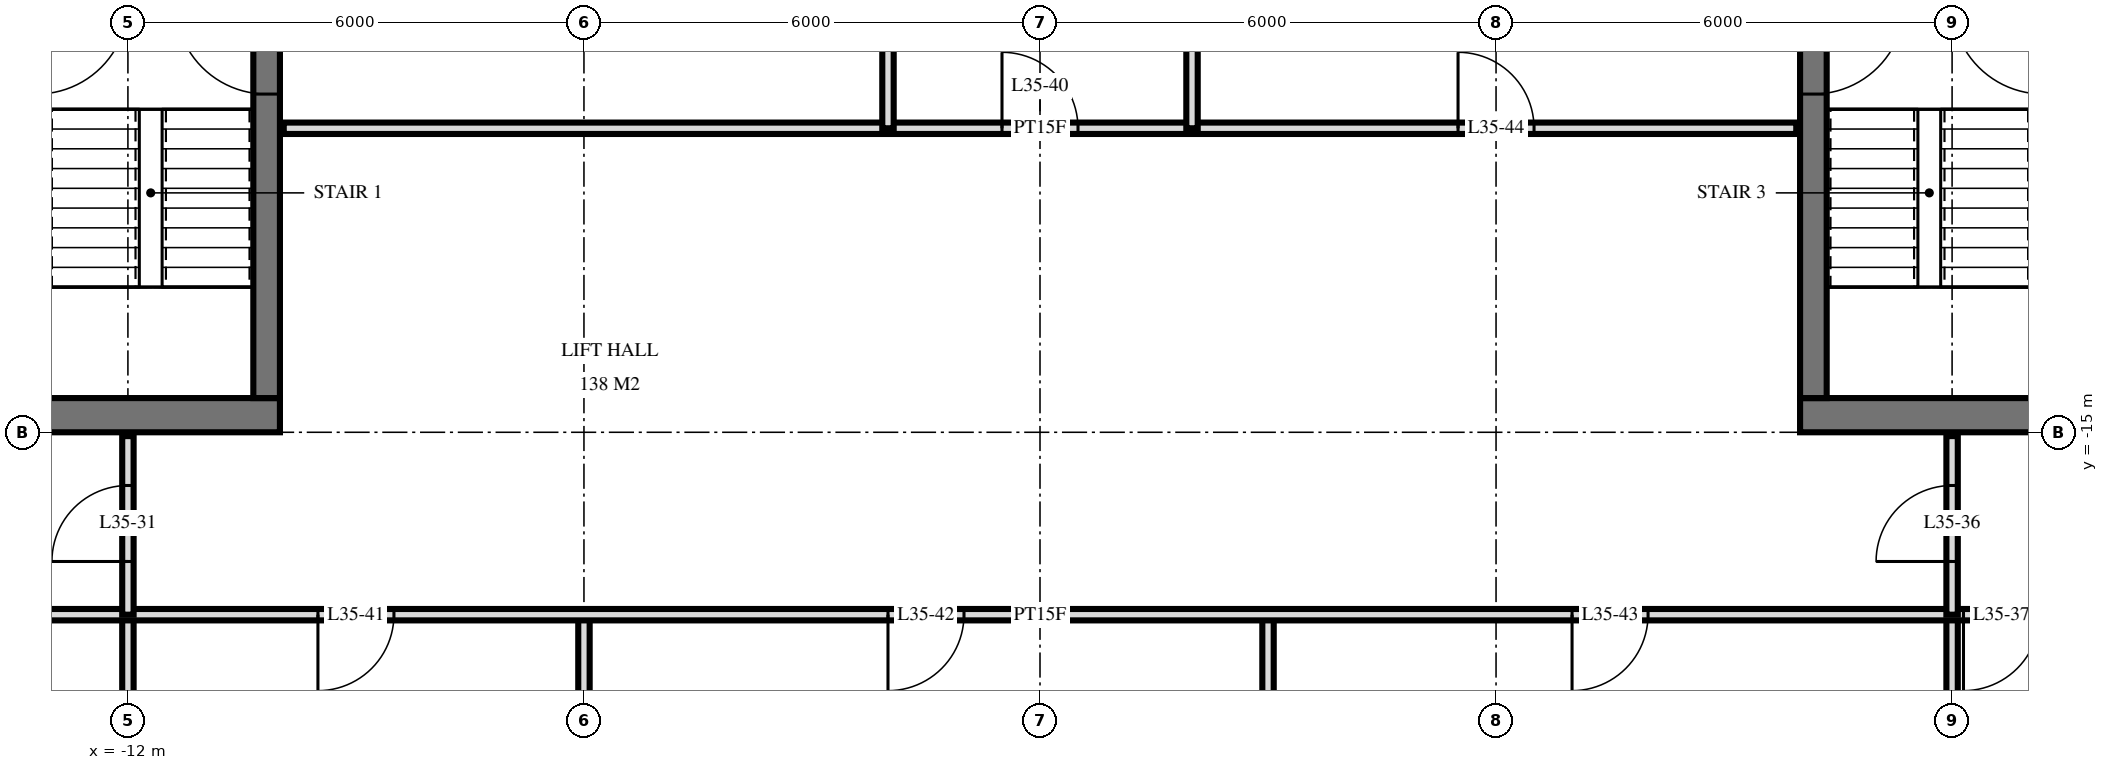
"""IFC4 building model, lengths in metres.
Left out: names, types, materials, properties, quantities, classifications, styles, units other than length and angle.
Written with IfcOpenShell. Run it as: python <this file> out.ifc"""

import sys

from ifc_helpers import new_model, si_unit, direction, frame, frame_2d, origin, place, context, subcontext, project, spatial, rectangle, extrude, element, fill, save


model = new_model("IFC4")
c1 = context("Model", 3, precision=1e-05, world=origin(), true_north=direction((0.0, 1.0)))
c2 = subcontext(c1, "Body", "Model", "MODEL_VIEW")
j1 = project(units=[si_unit("LENGTHUNIT", "METRE"), si_unit("PLANEANGLEUNIT", "RADIAN")], contexts=[c1])
p1 = place(None, origin())
s1 = spatial("IfcSite", under=j1, at=p1, CompositionType="ELEMENT")
p2 = place(p1, origin())
s2 = spatial("IfcBuilding", under=s1, at=p2, CompositionType="ELEMENT")
p3 = place(p2, frame((0.0, 0.0, 138.0)))
s3 = spatial("IfcBuildingStorey", under=s2, at=p3, CompositionType="ELEMENT", Elevation=138.0)
p4 = place(p3, frame((-24.5, -14.775, 0.0), z_axis=(0.0, 0.0, 1.0), x_axis=(1.0, 0.0, 0.0)))
e1 = element("IfcWall", 1, at=p4, inside=s3, PredefinedType="SHEAR", context=c2, shape_type="SweptSolid", body=[
    extrude(rectangle(XDim=14.5, YDim=0.45, at=frame_2d((7.25, 0.0))), origin(), (0.0, 0.0, 1.0), 3.6),
])
p5 = place(p4, frame((6.2, 0.0, 0.0)))
e2 = element("IfcOpeningElement", 2, at=p5, cuts=e1, PredefinedType="OPENING", context=c2, shape_type="SweptSolid", body=[
    extrude(rectangle(XDim=1.2, YDim=2.1, at=frame_2d((0.6, 1.05))), frame((0.0, 0.235, 0.0), z_axis=(0.0, -1.0, 0.0), x_axis=(1.0, 0.0, 0.0)), (0.0, 0.0, 1.0), 0.47),
])
p6 = place(p4, frame((9.25, 0.0, 0.0)))
e3 = element("IfcOpeningElement", 3, at=p6, cuts=e1, PredefinedType="OPENING", context=c2, shape_type="SweptSolid", body=[
    extrude(rectangle(XDim=1.1, YDim=2.1, at=frame_2d((0.55, 1.05))), frame((0.0, 0.235, 0.0), z_axis=(0.0, -1.0, 0.0), x_axis=(1.0, 0.0, 0.0)), (0.0, 0.0, 1.0), 0.47),
])
p7 = place(p4, frame((3.5, 0.0, 0.0)))
e4 = element("IfcOpeningElement", 4, at=p7, cuts=e1, PredefinedType="OPENING", context=c2, shape_type="SweptSolid", body=[
    extrude(rectangle(XDim=0.9, YDim=2.1, at=frame_2d((0.45, 1.05))), frame((0.0, 0.235, 0.0), z_axis=(0.0, -1.0, 0.0), x_axis=(1.0, 0.0, 0.0)), (0.0, 0.0, 1.0), 0.47),
])
p8 = place(p4, frame((1.05, 0.0, 0.0)))
e5 = element("IfcOpeningElement", 5, at=p8, cuts=e1, PredefinedType="OPENING", context=c2, shape_type="SweptSolid", body=[
    extrude(rectangle(XDim=1.0, YDim=2.1, at=frame_2d((0.5, 1.05))), frame((0.0, 0.235, 0.0), z_axis=(0.0, -1.0, 0.0), x_axis=(1.0, 0.0, 0.0)), (0.0, 0.0, 1.0), 0.47),
])
p9 = place(p3, frame((-10.175, -14.55, 0.0), z_axis=(0.0, 0.0, 1.0), x_axis=(0.0, 1.0, 0.0)))
e6 = element("IfcWall", 6, at=p9, inside=s3, PredefinedType="SHEAR", context=c2, shape_type="SweptSolid", body=[
    extrude(rectangle(XDim=14.1, YDim=0.35, at=frame_2d((7.05, 0.0))), origin(), (0.0, 0.0, 1.0), 3.6),
])
p10 = place(p9, frame((8.4, 0.0, 0.0)))
e7 = element("IfcOpeningElement", 7, at=p10, cuts=e6, PredefinedType="OPENING", context=c2, shape_type="SweptSolid", body=[
    extrude(rectangle(XDim=1.4, YDim=2.4, at=frame_2d((0.7, 1.2))), frame((0.0, 0.185, 0.0), z_axis=(0.0, -1.0, 0.0), x_axis=(1.0, 0.0, 0.0)), (0.0, 0.0, 1.0), 0.37),
])
p11 = place(p9, frame((10.0, 0.0, 0.0)))
e8 = element("IfcOpeningElement", 8, at=p11, cuts=e6, PredefinedType="OPENING", context=c2, shape_type="SweptSolid", body=[
    extrude(rectangle(XDim=1.4, YDim=2.4, at=frame_2d((0.7, 1.2))), frame((0.0, 0.185, 0.0), z_axis=(0.0, -1.0, 0.0), x_axis=(1.0, 0.0, 0.0)), (0.0, 0.0, 1.0), 0.37),
])
p12 = place(p9, frame((4.0, 0.0, 0.0)))
e9 = element("IfcOpeningElement", 9, at=p12, cuts=e6, PredefinedType="OPENING", context=c2, shape_type="SweptSolid", body=[
    extrude(rectangle(XDim=1.2, YDim=2.1, at=frame_2d((0.6, 1.05))), frame((0.0, 0.185, 0.0), z_axis=(0.0, -1.0, 0.0), x_axis=(1.0, 0.0, 0.0)), (0.0, 0.0, 1.0), 0.37),
])
p13 = place(p3, frame((10.0, -14.775, 0.0), z_axis=(0.0, 0.0, 1.0), x_axis=(1.0, 0.0, 0.0)))
e10 = element("IfcWall", 10, at=p13, inside=s3, PredefinedType="SHEAR", context=c2, shape_type="SweptSolid", body=[
    extrude(rectangle(XDim=14.5, YDim=0.45, at=frame_2d((7.25, 0.0))), origin(), (0.0, 0.0, 1.0), 3.6),
])
p14 = place(p13, frame((7.1, 0.0, 0.0)))
e11 = element("IfcOpeningElement", 11, at=p14, cuts=e10, PredefinedType="OPENING", context=c2, shape_type="SweptSolid", body=[
    extrude(rectangle(XDim=1.2, YDim=2.1, at=frame_2d((0.6, 1.05))), frame((0.0, 0.235, 0.0), z_axis=(0.0, -1.0, 0.0), x_axis=(1.0, 0.0, 0.0)), (0.0, 0.0, 1.0), 0.47),
])
p15 = place(p13, frame((4.15, 0.0, 0.0)))
e12 = element("IfcOpeningElement", 12, at=p15, cuts=e10, PredefinedType="OPENING", context=c2, shape_type="SweptSolid", body=[
    extrude(rectangle(XDim=1.1, YDim=2.1, at=frame_2d((0.55, 1.05))), frame((0.0, 0.235, 0.0), z_axis=(0.0, -1.0, 0.0), x_axis=(1.0, 0.0, 0.0)), (0.0, 0.0, 1.0), 0.47),
])
p16 = place(p13, frame((10.1, 0.0, 0.0)))
e13 = element("IfcOpeningElement", 13, at=p16, cuts=e10, PredefinedType="OPENING", context=c2, shape_type="SweptSolid", body=[
    extrude(rectangle(XDim=0.9, YDim=2.1, at=frame_2d((0.45, 1.05))), frame((0.0, 0.235, 0.0), z_axis=(0.0, -1.0, 0.0), x_axis=(1.0, 0.0, 0.0)), (0.0, 0.0, 1.0), 0.47),
])
p17 = place(p13, frame((12.45, 0.0, 0.0)))
e14 = element("IfcOpeningElement", 14, at=p17, cuts=e10, PredefinedType="OPENING", context=c2, shape_type="SweptSolid", body=[
    extrude(rectangle(XDim=1.0, YDim=2.1, at=frame_2d((0.5, 1.05))), frame((0.0, 0.235, 0.0), z_axis=(0.0, -1.0, 0.0), x_axis=(1.0, 0.0, 0.0)), (0.0, 0.0, 1.0), 0.47),
])
p18 = place(p3, frame((10.175, -14.55, 0.0), z_axis=(0.0, 0.0, 1.0), x_axis=(0.0, 1.0, 0.0)))
e15 = element("IfcWall", 15, at=p18, inside=s3, PredefinedType="SHEAR", context=c2, shape_type="SweptSolid", body=[
    extrude(rectangle(XDim=14.1, YDim=0.35, at=frame_2d((7.05, 0.0))), origin(), (0.0, 0.0, 1.0), 3.6),
])
p19 = place(p18, frame((8.4, 0.0, 0.0)))
e16 = element("IfcOpeningElement", 16, at=p19, cuts=e15, PredefinedType="OPENING", context=c2, shape_type="SweptSolid", body=[
    extrude(rectangle(XDim=1.4, YDim=2.4, at=frame_2d((0.7, 1.2))), frame((0.0, 0.185, 0.0), z_axis=(0.0, -1.0, 0.0), x_axis=(1.0, 0.0, 0.0)), (0.0, 0.0, 1.0), 0.37),
])
p20 = place(p18, frame((10.0, 0.0, 0.0)))
e17 = element("IfcOpeningElement", 17, at=p20, cuts=e15, PredefinedType="OPENING", context=c2, shape_type="SweptSolid", body=[
    extrude(rectangle(XDim=1.4, YDim=2.4, at=frame_2d((0.7, 1.2))), frame((0.0, 0.185, 0.0), z_axis=(0.0, -1.0, 0.0), x_axis=(1.0, 0.0, 0.0)), (0.0, 0.0, 1.0), 0.37),
])
p21 = place(p18, frame((4.0, 0.0, 0.0)))
e18 = element("IfcOpeningElement", 18, at=p21, cuts=e15, PredefinedType="OPENING", context=c2, shape_type="SweptSolid", body=[
    extrude(rectangle(XDim=1.2, YDim=2.1, at=frame_2d((0.6, 1.05))), frame((0.0, 0.185, 0.0), z_axis=(0.0, -1.0, 0.0), x_axis=(1.0, 0.0, 0.0)), (0.0, 0.0, 1.0), 0.37),
])
p22 = place(p3, frame((12.0, -17.4, 0.0), z_axis=(0.0, 0.0, 1.0), x_axis=(0.0, 1.0, 0.0)))
e19 = element("IfcWall", 19, at=p22, inside=s3, PredefinedType="PARTITIONING", context=c2, shape_type="SweptSolid", body=[
    extrude(rectangle(XDim=2.35, YDim=0.15, at=frame_2d((1.175, 0.0))), origin(), (0.0, 0.0, 1.0), 3.32),
])
p23 = place(p22, frame((0.7, 0.0, 0.0)))
e20 = element("IfcOpeningElement", 20, at=p23, cuts=e19, PredefinedType="OPENING", context=c2, shape_type="SweptSolid", body=[
    extrude(rectangle(XDim=1.0, YDim=2.1, at=frame_2d((0.5, 1.05))), frame((0.0, 0.085, 0.0), z_axis=(0.0, -1.0, 0.0), x_axis=(1.0, 0.0, 0.0)), (0.0, 0.0, 1.0), 0.17),
])
for number, where, z_axis, x_axis in (
    (21, (12.0, -33.62, 0.0), (0.0, 0.0, 1.0), (0.0, 1.0, 0.0)),
    (22, (3.0, -33.62, 0.0), (0.0, 0.0, 1.0), (0.0, 1.0, 0.0)),
):
    element("IfcWall", number, at=place(p3, frame(where, z_axis=z_axis, x_axis=x_axis)), inside=s3, PredefinedType="PARTITIONING", context=c2, shape_type="SweptSolid", body=[
        extrude(rectangle(XDim=16.22, YDim=0.15, at=frame_2d((8.11, 0.0))), origin(), (0.0, 0.0, 1.0), 3.32),
    ])
for number, where, z_axis, x_axis in (
    (23, (2.0, -11.0, 0.0), (0.0, 0.0, 1.0), (0.0, 1.0, 0.0)),
    (24, (-2.0, -11.0, 0.0), (0.0, 0.0, 1.0), (0.0, 1.0, 0.0)),
):
    element("IfcWall", number, at=place(p3, frame(where, z_axis=z_axis, x_axis=x_axis)), inside=s3, PredefinedType="PARTITIONING", context=c2, shape_type="SweptSolid", body=[
        extrude(rectangle(XDim=4.0, YDim=0.15, at=frame_2d((2.0, 0.0))), origin(), (0.0, 0.0, 1.0), 3.32),
    ])
p24 = place(p3, frame((-6.0, -33.62, 0.0), z_axis=(0.0, 0.0, 1.0), x_axis=(0.0, 1.0, 0.0)))
e25 = element("IfcWall", 25, at=p24, inside=s3, PredefinedType="PARTITIONING", context=c2, shape_type="SweptSolid", body=[
    extrude(rectangle(XDim=16.22, YDim=0.15, at=frame_2d((8.11, 0.0))), origin(), (0.0, 0.0, 1.0), 3.32),
])
p25 = place(p3, frame((-12.0, -17.4, 0.0), z_axis=(0.0, 0.0, 1.0), x_axis=(0.0, 1.0, 0.0)))
e26 = element("IfcWall", 26, at=p25, inside=s3, PredefinedType="PARTITIONING", context=c2, shape_type="SweptSolid", body=[
    extrude(rectangle(XDim=2.35, YDim=0.15, at=frame_2d((1.175, 0.0))), origin(), (0.0, 0.0, 1.0), 3.32),
])
p26 = place(p25, frame((0.7, 0.0, 0.0)))
e27 = element("IfcOpeningElement", 27, at=p26, cuts=e26, PredefinedType="OPENING", context=c2, shape_type="SweptSolid", body=[
    extrude(rectangle(XDim=1.0, YDim=2.1, at=frame_2d((0.5, 1.05))), frame((0.0, 0.085, 0.0), z_axis=(0.0, -1.0, 0.0), x_axis=(1.0, 0.0, 0.0)), (0.0, 0.0, 1.0), 0.17),
])
p27 = place(p3, frame((-12.0, -33.62, 0.0), z_axis=(0.0, 0.0, 1.0), x_axis=(0.0, 1.0, 0.0)))
e28 = element("IfcWall", 28, at=p27, inside=s3, PredefinedType="PARTITIONING", context=c2, shape_type="SweptSolid", body=[
    extrude(rectangle(XDim=16.22, YDim=0.15, at=frame_2d((8.11, 0.0))), origin(), (0.0, 0.0, 1.0), 3.32),
])
p28 = place(p3, frame((-28.02, -17.4, 0.0), z_axis=(0.0, 0.0, 1.0), x_axis=(1.0, 0.0, 0.0)))
e29 = element("IfcWall", 29, at=p28, inside=s3, PredefinedType="PARTITIONING", context=c2, shape_type="SweptSolid", body=[
    extrude(rectangle(XDim=56.04, YDim=0.15, at=frame_2d((28.02, 0.0))), origin(), (0.0, 0.0, 1.0), 3.32),
])
p29 = place(p28, frame((13.17, 0.0, 0.0)))
e30 = element("IfcOpeningElement", 30, at=p29, cuts=e29, PredefinedType="OPENING", context=c2, shape_type="SweptSolid", body=[
    extrude(rectangle(XDim=1.0, YDim=2.1, at=frame_2d((0.5, 1.05))), frame((0.0, 0.085, 0.0), z_axis=(0.0, -1.0, 0.0), x_axis=(1.0, 0.0, 0.0)), (0.0, 0.0, 1.0), 0.17),
])
p30 = place(p28, frame((11.87, 0.0, 0.0)))
e31 = element("IfcOpeningElement", 31, at=p30, cuts=e29, PredefinedType="OPENING", context=c2, shape_type="SweptSolid", body=[
    extrude(rectangle(XDim=1.0, YDim=2.1, at=frame_2d((0.5, 1.05))), frame((0.0, 0.085, 0.0), z_axis=(0.0, -1.0, 0.0), x_axis=(1.0, 0.0, 0.0)), (0.0, 0.0, 1.0), 0.17),
])
p31 = place(p28, frame((2.32, 0.0, 0.0)))
e32 = element("IfcOpeningElement", 32, at=p31, cuts=e29, PredefinedType="OPENING", context=c2, shape_type="SweptSolid", body=[
    extrude(rectangle(XDim=1.0, YDim=2.1, at=frame_2d((0.5, 1.05))), frame((0.0, 0.085, 0.0), z_axis=(0.0, -1.0, 0.0), x_axis=(1.0, 0.0, 0.0)), (0.0, 0.0, 1.0), 0.17),
])
p32 = place(p28, frame((40.17, 0.0, 0.0)))
e33 = element("IfcOpeningElement", 33, at=p32, cuts=e29, PredefinedType="OPENING", context=c2, shape_type="SweptSolid", body=[
    extrude(rectangle(XDim=1.0, YDim=2.1, at=frame_2d((0.5, 1.05))), frame((0.0, 0.085, 0.0), z_axis=(0.0, -1.0, 0.0), x_axis=(1.0, 0.0, 0.0)), (0.0, 0.0, 1.0), 0.17),
])
p33 = place(p28, frame((51.22, 0.0, 0.0)))
e34 = element("IfcOpeningElement", 34, at=p33, cuts=e29, PredefinedType="OPENING", context=c2, shape_type="SweptSolid", body=[
    extrude(rectangle(XDim=1.0, YDim=2.1, at=frame_2d((0.5, 1.05))), frame((0.0, 0.085, 0.0), z_axis=(0.0, -1.0, 0.0), x_axis=(1.0, 0.0, 0.0)), (0.0, 0.0, 1.0), 0.17),
])
p34 = place(p28, frame((18.52, 0.0, 0.0)))
e35 = element("IfcOpeningElement", 35, at=p34, cuts=e29, PredefinedType="OPENING", context=c2, shape_type="SweptSolid", body=[
    extrude(rectangle(XDim=1.0, YDim=2.1, at=frame_2d((0.5, 1.05))), frame((0.0, 0.085, 0.0), z_axis=(0.0, -1.0, 0.0), x_axis=(1.0, 0.0, 0.0)), (0.0, 0.0, 1.0), 0.17),
])
p35 = place(p28, frame((26.02, 0.0, 0.0)))
e36 = element("IfcOpeningElement", 36, at=p35, cuts=e29, PredefinedType="OPENING", context=c2, shape_type="SweptSolid", body=[
    extrude(rectangle(XDim=1.0, YDim=2.1, at=frame_2d((0.5, 1.05))), frame((0.0, 0.085, 0.0), z_axis=(0.0, -1.0, 0.0), x_axis=(1.0, 0.0, 0.0)), (0.0, 0.0, 1.0), 0.17),
])
p36 = place(p28, frame((35.02, 0.0, 0.0)))
e37 = element("IfcOpeningElement", 37, at=p36, cuts=e29, PredefinedType="OPENING", context=c2, shape_type="SweptSolid", body=[
    extrude(rectangle(XDim=1.0, YDim=2.1, at=frame_2d((0.5, 1.05))), frame((0.0, 0.085, 0.0), z_axis=(0.0, -1.0, 0.0), x_axis=(1.0, 0.0, 0.0)), (0.0, 0.0, 1.0), 0.17),
])
p37 = place(p3, frame((-9.95, -11.0, 0.0), z_axis=(0.0, 0.0, 1.0), x_axis=(1.0, 0.0, 0.0)))
e38 = element("IfcWall", 38, at=p37, inside=s3, PredefinedType="PARTITIONING", context=c2, shape_type="SweptSolid", body=[
    extrude(rectangle(XDim=19.9, YDim=0.15, at=frame_2d((9.95, 0.0))), origin(), (0.0, 0.0, 1.0), 3.32),
])
p38 = place(p37, frame((9.45, 0.0, 0.0)))
e39 = element("IfcOpeningElement", 39, at=p38, cuts=e38, PredefinedType="OPENING", context=c2, shape_type="SweptSolid", body=[
    extrude(rectangle(XDim=1.0, YDim=2.1, at=frame_2d((0.5, 1.05))), frame((0.0, 0.085, 0.0), z_axis=(0.0, -1.0, 0.0), x_axis=(1.0, 0.0, 0.0)), (0.0, 0.0, 1.0), 0.17),
])
p39 = place(p37, frame((15.45, 0.0, 0.0)))
e40 = element("IfcOpeningElement", 40, at=p39, cuts=e38, PredefinedType="OPENING", context=c2, shape_type="SweptSolid", body=[
    extrude(rectangle(XDim=1.0, YDim=2.1, at=frame_2d((0.5, 1.05))), frame((0.0, 0.085, 0.0), z_axis=(0.0, -1.0, 0.0), x_axis=(1.0, 0.0, 0.0)), (0.0, 0.0, 1.0), 0.17),
])
p40 = place(p12, origin())
e41 = element("IfcDoor", 41, at=p40, inside=s3, OperationType="SINGLE_SWING_LEFT", PredefinedType="DOOR", context=c2, shape_type="SweptSolid", body=[
    extrude(rectangle(XDim=1.2, YDim=2.1, at=frame_2d((0.6, 1.05))), frame((0.0, 0.025, 0.0), z_axis=(0.0, -1.0, 0.0), x_axis=(1.0, 0.0, 0.0)), (0.0, 0.0, 1.0), 0.05),
])
fill(e9, e41)
p41 = place(p21, frame((0.6, 0.0, 0.0), z_axis=(0.0, 0.0, 1.0), x_axis=(-1.0, 0.0, 0.0)))
e42 = element("IfcDoor", 42, at=p41, inside=s3, OperationType="SINGLE_SWING_RIGHT", PredefinedType="DOOR", context=c2, shape_type="SweptSolid", body=[
    extrude(rectangle(XDim=1.2, YDim=2.1, at=frame_2d((0.0, 1.05))), frame((0.0, -0.025, 0.0), z_axis=(0.0, 1.0, 0.0), x_axis=(-1.0, 0.0, 0.0)), (0.0, 0.0, 1.0), 0.05),
])
fill(e18, e42)
p42 = place(p26, origin())
e43 = element("IfcDoor", 43, at=p42, inside=s3, OperationType="SINGLE_SWING_RIGHT", PredefinedType="DOOR", context=c2, shape_type="SweptSolid", body=[
    extrude(rectangle(XDim=1.0, YDim=2.1, at=frame_2d((0.5, 1.05))), frame((0.0, 0.025, 0.0), z_axis=(0.0, -1.0, 0.0), x_axis=(1.0, 0.0, 0.0)), (0.0, 0.0, 1.0), 0.05),
])
fill(e27, e43)
p43 = place(p23, origin())
e44 = element("IfcDoor", 44, at=p43, inside=s3, OperationType="SINGLE_SWING_RIGHT", PredefinedType="DOOR", context=c2, shape_type="SweptSolid", body=[
    extrude(rectangle(XDim=1.0, YDim=2.1, at=frame_2d((0.5, 1.05))), frame((0.0, 0.025, 0.0), z_axis=(0.0, -1.0, 0.0), x_axis=(1.0, 0.0, 0.0)), (0.0, 0.0, 1.0), 0.05),
])
fill(e20, e44)
p44 = place(p32, frame((0.5, 0.0, 0.0), z_axis=(0.0, 0.0, 1.0), x_axis=(-1.0, 0.0, 0.0)))
e45 = element("IfcDoor", 45, at=p44, inside=s3, OperationType="SINGLE_SWING_LEFT", PredefinedType="DOOR", context=c2, shape_type="SweptSolid", body=[
    extrude(rectangle(XDim=1.0, YDim=2.1, at=frame_2d((0.0, 1.05))), frame((0.0, -0.025, 0.0), z_axis=(0.0, 1.0, 0.0), x_axis=(-1.0, 0.0, 0.0)), (0.0, 0.0, 1.0), 0.05),
])
fill(e33, e45)
p45 = place(p38, origin())
e46 = element("IfcDoor", 46, at=p45, inside=s3, OperationType="SINGLE_SWING_RIGHT", PredefinedType="DOOR", context=c2, shape_type="SweptSolid", body=[
    extrude(rectangle(XDim=1.0, YDim=2.1, at=frame_2d((0.5, 1.05))), frame((0.0, 0.025, 0.0), z_axis=(0.0, -1.0, 0.0), x_axis=(1.0, 0.0, 0.0)), (0.0, 0.0, 1.0), 0.05),
])
fill(e39, e46)
p46 = place(p34, frame((0.5, 0.0, 0.0), z_axis=(0.0, 0.0, 1.0), x_axis=(-1.0, 0.0, 0.0)))
e47 = element("IfcDoor", 47, at=p46, inside=s3, OperationType="SINGLE_SWING_LEFT", PredefinedType="DOOR", context=c2, shape_type="SweptSolid", body=[
    extrude(rectangle(XDim=1.0, YDim=2.1, at=frame_2d((0.0, 1.05))), frame((0.0, -0.025, 0.0), z_axis=(0.0, 1.0, 0.0), x_axis=(-1.0, 0.0, 0.0)), (0.0, 0.0, 1.0), 0.05),
])
fill(e35, e47)
p47 = place(p35, frame((0.5, 0.0, 0.0), z_axis=(0.0, 0.0, 1.0), x_axis=(-1.0, 0.0, 0.0)))
e48 = element("IfcDoor", 48, at=p47, inside=s3, OperationType="SINGLE_SWING_LEFT", PredefinedType="DOOR", context=c2, shape_type="SweptSolid", body=[
    extrude(rectangle(XDim=1.0, YDim=2.1, at=frame_2d((0.0, 1.05))), frame((0.0, -0.025, 0.0), z_axis=(0.0, 1.0, 0.0), x_axis=(-1.0, 0.0, 0.0)), (0.0, 0.0, 1.0), 0.05),
])
fill(e36, e48)
p48 = place(p36, frame((0.5, 0.0, 0.0), z_axis=(0.0, 0.0, 1.0), x_axis=(-1.0, 0.0, 0.0)))
e49 = element("IfcDoor", 49, at=p48, inside=s3, OperationType="SINGLE_SWING_LEFT", PredefinedType="DOOR", context=c2, shape_type="SweptSolid", body=[
    extrude(rectangle(XDim=1.0, YDim=2.1, at=frame_2d((0.0, 1.05))), frame((0.0, -0.025, 0.0), z_axis=(0.0, 1.0, 0.0), x_axis=(-1.0, 0.0, 0.0)), (0.0, 0.0, 1.0), 0.05),
])
fill(e37, e49)
p49 = place(p39, origin())
e50 = element("IfcDoor", 50, at=p49, inside=s3, OperationType="SINGLE_SWING_RIGHT", PredefinedType="DOOR", context=c2, shape_type="SweptSolid", body=[
    extrude(rectangle(XDim=1.0, YDim=2.1, at=frame_2d((0.5, 1.05))), frame((0.0, 0.025, 0.0), z_axis=(0.0, -1.0, 0.0), x_axis=(1.0, 0.0, 0.0)), (0.0, 0.0, 1.0), 0.05),
])
fill(e40, e50)
save(model, sys.argv[1])
